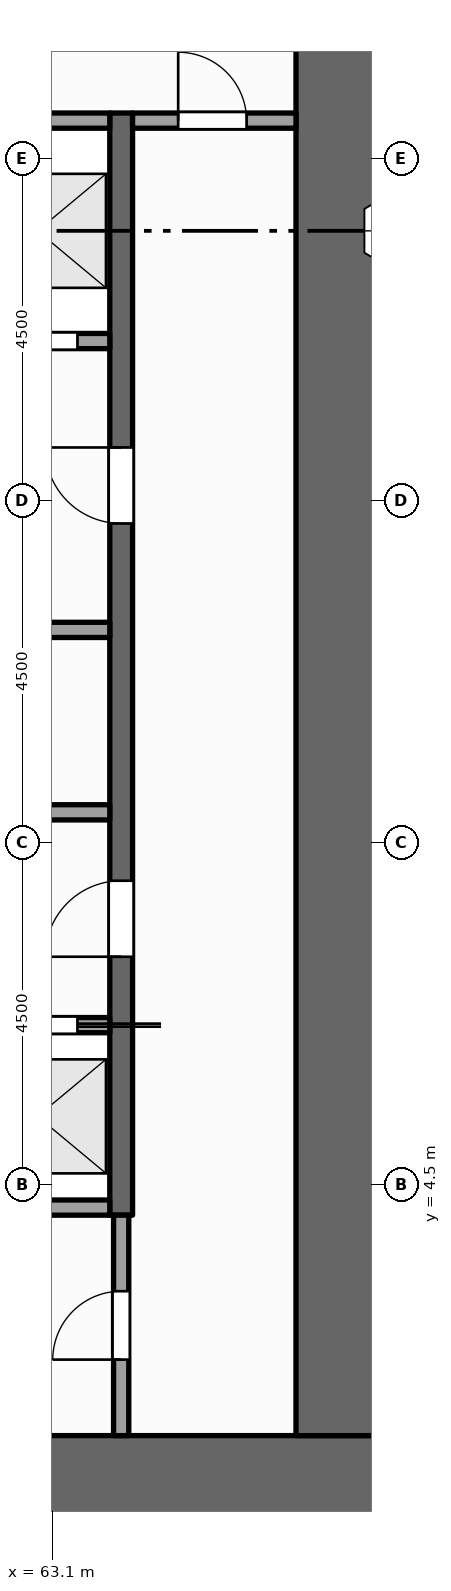
"""IFC4 building model, lengths in metres.
Left out: names, types, materials, properties, quantities, classifications, styles, units other than length and angle.
Written with IfcOpenShell. Run it as: python <this file> out.ifc"""

import sys

from ifc_helpers import new_model, si_unit, direction, frame, frame_2d, origin, place, context, subcontext, project, spatial, rectangle, extrude, element, fill, save


model = new_model("IFC4")
c1 = context("Model", 3, precision=1e-05, world=origin(), true_north=direction((0.0, 1.0)))
c2 = subcontext(c1, "Body", "Model", "MODEL_VIEW")
j1 = project(units=[si_unit("LENGTHUNIT", "METRE"), si_unit("PLANEANGLEUNIT", "RADIAN")], contexts=[c1])
p1 = place(None, origin())
s1 = spatial("IfcSite", under=j1, at=p1, CompositionType="ELEMENT")
p2 = place(p1, origin())
s2 = spatial("IfcBuilding", under=s1, at=p2, CompositionType="ELEMENT")
p3 = place(p2, frame((0.0, 0.0, 107.0)))
s3 = spatial("IfcBuildingStorey", under=s2, at=p3, CompositionType="ELEMENT", Elevation=107.0)
p4 = place(p3, frame((67.5, 0.6, -0.15), z_axis=(0.0, 0.0, 1.0), x_axis=(-1.0, 0.0, 0.0)))
e1 = element("IfcWall", 1, at=p4, inside=s3, PredefinedType="SHEAR", context=c2, shape_type="SweptSolid", body=[
    extrude(rectangle(XDim=13.5, YDim=1.2, at=frame_2d((6.75, 0.0))), origin(), (0.0, 0.0, 1.0), 4.0),
])
p5 = place(p3, frame((66.9, 1.2, -0.15), z_axis=(0.0, 0.0, 1.0), x_axis=(0.0, 1.0, 0.0)))
e2 = element("IfcWall", 2, at=p5, inside=s3, PredefinedType="SHEAR", context=c2, shape_type="SweptSolid", body=[
    extrude(rectangle(XDim=20.1, YDim=1.2, at=frame_2d((10.05, 0.0))), origin(), (0.0, 0.0, 1.0), 4.0),
])
p6 = place(p3, frame((64.0, 1.2, 0.0), z_axis=(0.0, 0.0, 1.0), x_axis=(0.0, 1.0, 0.0)))
e3 = element("IfcWall", 3, at=p6, inside=s3, PredefinedType="PARTITIONING", context=c2, shape_type="SweptSolid", body=[
    extrude(rectangle(XDim=2.9, YDim=0.2, at=frame_2d((1.45, 0.0))), origin(), (0.0, 0.0, 1.0), 3.85),
])
p7 = place(p6, frame((1.0, 0.0, 0.0)))
e4 = element("IfcOpeningElement", 4, at=p7, cuts=e3, PredefinedType="OPENING", context=c2, shape_type="SweptSolid", body=[
    extrude(rectangle(XDim=0.9, YDim=2.1, at=frame_2d((0.45, 1.05))), frame((0.0, 0.11, 0.0), z_axis=(0.0, -1.0, 0.0), x_axis=(1.0, 0.0, 0.0)), (0.0, 0.0, 1.0), 0.22),
])
p8 = place(p3, frame((64.0, 4.1, 0.0), z_axis=(0.0, 0.0, 1.0), x_axis=(0.0, 1.0, 0.0)))
e5 = element("IfcWall", 5, at=p8, inside=s3, PredefinedType="SHEAR", context=c2, shape_type="SweptSolid", body=[
    extrude(rectangle(XDim=14.5, YDim=0.3, at=frame_2d((7.25, 0.0))), origin(), (0.0, 0.0, 1.0), 3.85),
])
p9 = place(p8, frame((3.4, 0.0, 0.0)))
e6 = element("IfcOpeningElement", 6, at=p9, cuts=e5, PredefinedType="OPENING", context=c2, shape_type="SweptSolid", body=[
    extrude(rectangle(XDim=1.0, YDim=2.1, at=frame_2d((0.5, 1.05))), frame((0.0, 0.16, 0.0), z_axis=(0.0, -1.0, 0.0), x_axis=(1.0, 0.0, 0.0)), (0.0, 0.0, 1.0), 0.32),
])
p10 = place(p8, frame((9.1, 0.0, 0.0)))
e7 = element("IfcOpeningElement", 7, at=p10, cuts=e5, PredefinedType="OPENING", context=c2, shape_type="SweptSolid", body=[
    extrude(rectangle(XDim=1.0, YDim=2.1, at=frame_2d((0.5, 1.05))), frame((0.0, 0.16, 0.0), z_axis=(0.0, -1.0, 0.0), x_axis=(1.0, 0.0, 0.0)), (0.0, 0.0, 1.0), 0.32),
])
p11 = place(p3, frame((61.9, 4.2, 0.0), z_axis=(0.0, 0.0, 1.0), x_axis=(1.0, 0.0, 0.0)))
e8 = element("IfcWall", 8, at=p11, inside=s3, PredefinedType="SOLIDWALL", context=c2, shape_type="SweptSolid", body=[
    extrude(rectangle(XDim=1.95, YDim=0.2, at=frame_2d((0.975, 0.0))), origin(), (0.0, 0.0, 1.0), 3.85),
])
p12 = place(p3, frame((61.9, 6.6, 0.0), z_axis=(0.0, 0.0, 1.0), x_axis=(1.0, 0.0, 0.0)))
e9 = element("IfcWall", 9, at=p12, inside=s3, PredefinedType="SOLIDWALL", context=c2, shape_type="SweptSolid", body=[
    extrude(rectangle(XDim=1.95, YDim=0.2, at=frame_2d((0.975, 0.0))), origin(), (0.0, 0.0, 1.0), 3.85),
])
p13 = place(p12, frame((0.425, 0.0, 0.012)))
e10 = element("IfcOpeningElement", 10, at=p13, cuts=e9, PredefinedType="OPENING", context=c2, shape_type="SweptSolid", body=[
    extrude(rectangle(XDim=1.1, YDim=2.1, at=frame_2d((0.55, 1.05))), frame((0.0, 0.11, 0.0), z_axis=(0.0, -1.0, 0.0), x_axis=(1.0, 0.0, 0.0)), (0.0, 0.0, 1.0), 0.22),
])
p14 = place(p3, frame((55.2, 9.4, 0.0), z_axis=(0.0, 0.0, 1.0), x_axis=(1.0, 0.0, 0.0)))
e11 = element("IfcWall", 11, at=p14, inside=s3, PredefinedType="PARTITIONING", context=c2, shape_type="SweptSolid", body=[
    extrude(rectangle(XDim=8.65, YDim=0.2, at=frame_2d((4.325, 0.0))), origin(), (0.0, 0.0, 1.0), 3.85),
])
p15 = place(p14, frame((3.875, 0.0, 0.0)))
e12 = element("IfcOpeningElement", 12, at=p15, cuts=e11, PredefinedType="OPENING", context=c2, shape_type="SweptSolid", body=[
    extrude(rectangle(XDim=0.9, YDim=2.1, at=frame_2d((0.45, 1.05))), frame((0.0, 0.11, 0.0), z_axis=(0.0, -1.0, 0.0), x_axis=(1.0, 0.0, 0.0)), (0.0, 0.0, 1.0), 0.22),
])
p16 = place(p3, frame((59.7, 11.8, 0.0), z_axis=(0.0, 0.0, 1.0), x_axis=(1.0, 0.0, 0.0)))
e13 = element("IfcWall", 13, at=p16, inside=s3, PredefinedType="PARTITIONING", context=c2, shape_type="SweptSolid", body=[
    extrude(rectangle(XDim=4.15, YDim=0.2, at=frame_2d((2.075, 0.0))), origin(), (0.0, 0.0, 1.0), 3.85),
])
p17 = place(p3, frame((61.9, 15.6, 0.0), z_axis=(0.0, 0.0, 1.0), x_axis=(1.0, 0.0, 0.0)))
e14 = element("IfcWall", 14, at=p17, inside=s3, PredefinedType="SOLIDWALL", context=c2, shape_type="SweptSolid", body=[
    extrude(rectangle(XDim=1.95, YDim=0.2, at=frame_2d((0.975, 0.0))), origin(), (0.0, 0.0, 1.0), 3.85),
])
p18 = place(p17, frame((0.425, 0.0, 0.012)))
e15 = element("IfcOpeningElement", 15, at=p18, cuts=e14, PredefinedType="OPENING", context=c2, shape_type="SweptSolid", body=[
    extrude(rectangle(XDim=1.1, YDim=2.1, at=frame_2d((0.55, 1.05))), frame((0.0, 0.11, 0.0), z_axis=(0.0, -1.0, 0.0), x_axis=(1.0, 0.0, 0.0)), (0.0, 0.0, 1.0), 0.22),
])
p19 = place(p3, frame((61.9, 18.5, 0.0), z_axis=(0.0, 0.0, 1.0), x_axis=(1.0, 0.0, 0.0)))
e16 = element("IfcWall", 16, at=p19, inside=s3, PredefinedType="SOLIDWALL", context=c2, shape_type="SweptSolid", body=[
    extrude(rectangle(XDim=1.95, YDim=0.2, at=frame_2d((0.975, 0.0))), origin(), (0.0, 0.0, 1.0), 3.85),
])
p20 = place(p3, frame((64.15, 18.5, 0.0), z_axis=(0.0, 0.0, 1.0), x_axis=(1.0, 0.0, 0.0)))
e17 = element("IfcWall", 17, at=p20, inside=s3, PredefinedType="PARTITIONING", context=c2, shape_type="SweptSolid", body=[
    extrude(rectangle(XDim=2.15, YDim=0.2, at=frame_2d((1.075, 0.0))), origin(), (0.0, 0.0, 1.0), 3.85),
])
p21 = place(p20, frame((0.6, 0.0, 0.0)))
e18 = element("IfcOpeningElement", 18, at=p21, cuts=e17, PredefinedType="OPENING", context=c2, shape_type="SweptSolid", body=[
    extrude(rectangle(XDim=0.9, YDim=2.1, at=frame_2d((0.45, 1.05))), frame((0.0, 0.11, 0.0), z_axis=(0.0, -1.0, 0.0), x_axis=(1.0, 0.0, 0.0)), (0.0, 0.0, 1.0), 0.22),
])
p22 = place(p13, origin())
e19 = element("IfcDoor", 19, at=p22, inside=s3, OperationType="SLIDING_TO_RIGHT", PredefinedType="DOOR", context=c2, shape_type="SweptSolid", body=[
    extrude(rectangle(XDim=1.1, YDim=2.1, at=frame_2d((0.55, 1.05))), frame((0.0, 0.025, 0.0), z_axis=(0.0, -1.0, 0.0), x_axis=(1.0, 0.0, 0.0)), (0.0, 0.0, 1.0), 0.05),
])
fill(e10, e19)
p23 = place(p18, origin())
e20 = element("IfcDoor", 20, at=p23, inside=s3, OperationType="SLIDING_TO_LEFT", PredefinedType="DOOR", context=c2, shape_type="SweptSolid", body=[
    extrude(rectangle(XDim=1.1, YDim=2.1, at=frame_2d((0.55, 1.05))), frame((0.0, 0.025, 0.0), z_axis=(0.0, -1.0, 0.0), x_axis=(1.0, 0.0, 0.0)), (0.0, 0.0, 1.0), 0.05),
])
fill(e15, e20)
p24 = place(p9, origin())
e21 = element("IfcDoor", 21, at=p24, inside=s3, OperationType="SINGLE_SWING_LEFT", PredefinedType="DOOR", context=c2, shape_type="SweptSolid", body=[
    extrude(rectangle(XDim=1.0, YDim=2.1, at=frame_2d((0.5, 1.05))), frame((0.0, 0.025, 0.0), z_axis=(0.0, -1.0, 0.0), x_axis=(1.0, 0.0, 0.0)), (0.0, 0.0, 1.0), 0.05),
])
fill(e6, e21)
p25 = place(p10, origin())
e22 = element("IfcDoor", 22, at=p25, inside=s3, OperationType="SINGLE_SWING_RIGHT", PredefinedType="DOOR", context=c2, shape_type="SweptSolid", body=[
    extrude(rectangle(XDim=1.0, YDim=2.1, at=frame_2d((0.5, 1.05))), frame((0.0, 0.025, 0.0), z_axis=(0.0, -1.0, 0.0), x_axis=(1.0, 0.0, 0.0)), (0.0, 0.0, 1.0), 0.05),
])
fill(e7, e22)
p26 = place(p7, origin())
e23 = element("IfcDoor", 23, at=p26, inside=s3, OperationType="SINGLE_SWING_LEFT", PredefinedType="DOOR", context=c2, shape_type="SweptSolid", body=[
    extrude(rectangle(XDim=0.9, YDim=2.1, at=frame_2d((0.45, 1.05))), frame((0.0, 0.025, 0.0), z_axis=(0.0, -1.0, 0.0), x_axis=(1.0, 0.0, 0.0)), (0.0, 0.0, 1.0), 0.05),
])
fill(e4, e23)
p27 = place(p21, origin())
e24 = element("IfcDoor", 24, at=p27, inside=s3, OperationType="SINGLE_SWING_LEFT", PredefinedType="DOOR", context=c2, shape_type="SweptSolid", body=[
    extrude(rectangle(XDim=0.9, YDim=2.1, at=frame_2d((0.45, 1.05))), frame((0.0, 0.025, 0.0), z_axis=(0.0, -1.0, 0.0), x_axis=(1.0, 0.0, 0.0)), (0.0, 0.0, 1.0), 0.05),
])
fill(e18, e24)
save(model, sys.argv[1])
